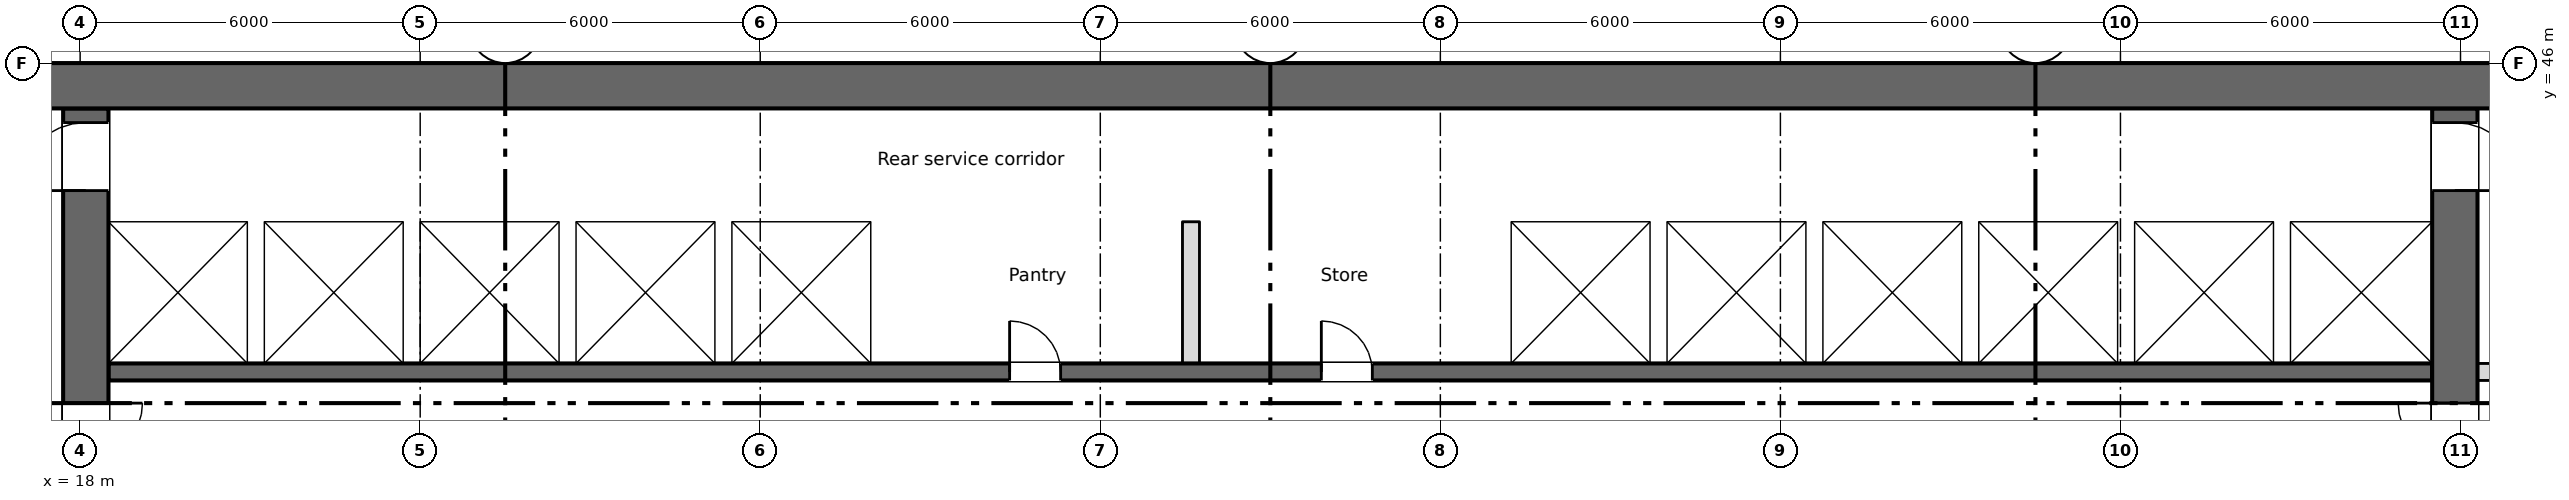
"""IFC4 building model, lengths in metres.
Left out: names, types, materials, properties, quantities, classifications, styles, units other than length and angle.
Written with IfcOpenShell. Run it as: python <this file> out.ifc"""

import sys

from ifc_helpers import new_model, si_unit, direction, frame, frame_2d, origin, place, context, subcontext, project, spatial, rectangle, extrude, element, fill, save


model = new_model("IFC4")
c1 = context("Model", 3, precision=1e-05, world=origin(), true_north=direction((0.0, 1.0)))
c2 = subcontext(c1, "Body", "Model", "MODEL_VIEW")
j1 = project(units=[si_unit("LENGTHUNIT", "METRE"), si_unit("PLANEANGLEUNIT", "RADIAN")], contexts=[c1])
p1 = place(None, origin())
s1 = spatial("IfcSite", under=j1, at=p1, CompositionType="ELEMENT")
p2 = place(p1, origin())
s2 = spatial("IfcBuilding", under=s1, at=p2, CompositionType="ELEMENT")
p3 = place(p2, frame((0.0, 0.0, 155.0)))
s3 = spatial("IfcBuildingStorey", under=s2, at=p3, CompositionType="ELEMENT", Elevation=155.0)
p4 = place(p3, frame((5.55, 45.6, 0.0), z_axis=(0.0, 0.0, 1.0), x_axis=(1.0, 0.0, 0.0)))
e1 = element("IfcWall", 1, at=p4, inside=s3, PredefinedType="SHEAR", context=c2, shape_type="SweptSolid", body=[
    extrude(rectangle(XDim=60.9, YDim=0.8, at=frame_2d((30.45, 0.0))), origin(), (0.0, 0.0, 1.0), 3.15),
])
p5 = place(p4, frame((1.2, 0.0, 0.6)))
e2 = element("IfcOpeningElement", 2, at=p5, cuts=e1, PredefinedType="OPENING", context=c2, shape_type="SweptSolid", body=[
    extrude(rectangle(XDim=0.6, YDim=2.4, at=frame_2d((0.3, 1.2))), frame((0.0, 0.41, 0.0), z_axis=(0.0, -1.0, 0.0), x_axis=(1.0, 0.0, 0.0)), (0.0, 0.0, 1.0), 0.82),
])
p6 = place(p4, frame((7.2, 0.0, 0.6)))
e3 = element("IfcOpeningElement", 3, at=p6, cuts=e1, PredefinedType="OPENING", context=c2, shape_type="SweptSolid", body=[
    extrude(rectangle(XDim=0.6, YDim=2.4, at=frame_2d((0.3, 1.2))), frame((0.0, 0.41, 0.0), z_axis=(0.0, -1.0, 0.0), x_axis=(1.0, 0.0, 0.0)), (0.0, 0.0, 1.0), 0.82),
])
p7 = place(p3, frame((18.1, 28.4, 0.0), z_axis=(0.0, 0.0, 1.0), x_axis=(0.0, 1.0, 0.0)))
e4 = element("IfcWall", 4, at=p7, inside=s3, PredefinedType="SHEAR", context=c2, shape_type="SweptSolid", body=[
    extrude(rectangle(XDim=16.8, YDim=0.8, at=frame_2d((8.4, 0.0))), origin(), (0.0, 0.0, 1.0), 3.15),
])
p8 = place(p7, frame((9.6, 0.0, 0.0)))
e5 = element("IfcOpeningElement", 5, at=p8, cuts=e4, PredefinedType="OPENING", context=c2, shape_type="SweptSolid", body=[
    extrude(rectangle(XDim=2.0, YDim=2.1, at=frame_2d((1.0, 1.05))), frame((0.0, 0.41, 0.0), z_axis=(0.0, -1.0, 0.0), x_axis=(1.0, 0.0, 0.0)), (0.0, 0.0, 1.0), 0.82),
])
p9 = place(p7, frame((15.35, 0.0, 0.0)))
e6 = element("IfcOpeningElement", 6, at=p9, cuts=e4, PredefinedType="OPENING", context=c2, shape_type="SweptSolid", body=[
    extrude(rectangle(XDim=1.2, YDim=2.1, at=frame_2d((0.6, 1.05))), frame((0.0, 0.41, 0.0), z_axis=(0.0, -1.0, 0.0), x_axis=(1.0, 0.0, 0.0)), (0.0, 0.0, 1.0), 0.82),
])
p10 = place(p3, frame((59.9, 28.4, 0.0), z_axis=(0.0, 0.0, 1.0), x_axis=(0.0, 1.0, 0.0)))
e7 = element("IfcWall", 7, at=p10, inside=s3, PredefinedType="SHEAR", context=c2, shape_type="SweptSolid", body=[
    extrude(rectangle(XDim=16.8, YDim=0.8, at=frame_2d((8.4, 0.0))), origin(), (0.0, 0.0, 1.0), 3.15),
])
p11 = place(p10, frame((9.6, 0.0, 0.0)))
e8 = element("IfcOpeningElement", 8, at=p11, cuts=e7, PredefinedType="OPENING", context=c2, shape_type="SweptSolid", body=[
    extrude(rectangle(XDim=2.0, YDim=2.1, at=frame_2d((1.0, 1.05))), frame((0.0, 0.41, 0.0), z_axis=(0.0, -1.0, 0.0), x_axis=(1.0, 0.0, 0.0)), (0.0, 0.0, 1.0), 0.82),
])
p12 = place(p10, frame((15.35, 0.0, 0.0)))
e9 = element("IfcOpeningElement", 9, at=p12, cuts=e7, PredefinedType="OPENING", context=c2, shape_type="SweptSolid", body=[
    extrude(rectangle(XDim=1.2, YDim=2.1, at=frame_2d((0.6, 1.05))), frame((0.0, 0.41, 0.0), z_axis=(0.0, -1.0, 0.0), x_axis=(1.0, 0.0, 0.0)), (0.0, 0.0, 1.0), 0.82),
])
p13 = place(p3, frame((18.5, 40.55, 0.0), z_axis=(0.0, 0.0, 1.0), x_axis=(1.0, 0.0, 0.0)))
e10 = element("IfcWall", 10, at=p13, inside=s3, PredefinedType="SHEAR", context=c2, shape_type="SweptSolid", body=[
    extrude(rectangle(XDim=41.0, YDim=0.3, at=frame_2d((20.5, 0.0))), origin(), (0.0, 0.0, 1.0), 3.15),
])
p14 = place(p13, frame((15.9, 0.0, 0.0)))
e11 = element("IfcOpeningElement", 11, at=p14, cuts=e10, PredefinedType="OPENING", context=c2, shape_type="SweptSolid", body=[
    extrude(rectangle(XDim=0.9, YDim=2.1, at=frame_2d((0.45, 1.05))), frame((0.0, 0.16, 0.0), z_axis=(0.0, -1.0, 0.0), x_axis=(1.0, 0.0, 0.0)), (0.0, 0.0, 1.0), 0.32),
])
p15 = place(p13, frame((21.4, 0.0, 0.0)))
e12 = element("IfcOpeningElement", 12, at=p15, cuts=e10, PredefinedType="OPENING", context=c2, shape_type="SweptSolid", body=[
    extrude(rectangle(XDim=0.9, YDim=2.1, at=frame_2d((0.45, 1.05))), frame((0.0, 0.16, 0.0), z_axis=(0.0, -1.0, 0.0), x_axis=(1.0, 0.0, 0.0)), (0.0, 0.0, 1.0), 0.32),
])
p16 = place(p13, frame((6.175, 0.0, 0.0)))
e13 = element("IfcOpeningElement", 13, at=p16, cuts=e10, PredefinedType="OPENING", context=c2, shape_type="SweptSolid", body=[
    extrude(rectangle(XDim=1.1, YDim=2.1, at=frame_2d((0.55, 1.05))), frame((0.0, 0.16, 0.0), z_axis=(0.0, -1.0, 0.0), x_axis=(1.0, 0.0, 0.0)), (0.0, 0.0, 1.0), 0.32),
])
p17 = place(p13, frame((8.925, 0.0, 0.0)))
e14 = element("IfcOpeningElement", 14, at=p17, cuts=e10, PredefinedType="OPENING", context=c2, shape_type="SweptSolid", body=[
    extrude(rectangle(XDim=1.1, YDim=2.1, at=frame_2d((0.55, 1.05))), frame((0.0, 0.16, 0.0), z_axis=(0.0, -1.0, 0.0), x_axis=(1.0, 0.0, 0.0)), (0.0, 0.0, 1.0), 0.32),
])
p18 = place(p13, frame((11.675, 0.0, 0.0)))
e15 = element("IfcOpeningElement", 15, at=p18, cuts=e10, PredefinedType="OPENING", context=c2, shape_type="SweptSolid", body=[
    extrude(rectangle(XDim=1.1, YDim=2.1, at=frame_2d((0.55, 1.05))), frame((0.0, 0.16, 0.0), z_axis=(0.0, -1.0, 0.0), x_axis=(1.0, 0.0, 0.0)), (0.0, 0.0, 1.0), 0.32),
])
p19 = place(p13, frame((30.925, 0.0, 0.0)))
e16 = element("IfcOpeningElement", 16, at=p19, cuts=e10, PredefinedType="OPENING", context=c2, shape_type="SweptSolid", body=[
    extrude(rectangle(XDim=1.1, YDim=2.1, at=frame_2d((0.55, 1.05))), frame((0.0, 0.16, 0.0), z_axis=(0.0, -1.0, 0.0), x_axis=(1.0, 0.0, 0.0)), (0.0, 0.0, 1.0), 0.32),
])
p20 = place(p13, frame((33.675, 0.0, 0.0)))
e17 = element("IfcOpeningElement", 17, at=p20, cuts=e10, PredefinedType="OPENING", context=c2, shape_type="SweptSolid", body=[
    extrude(rectangle(XDim=1.1, YDim=2.1, at=frame_2d((0.55, 1.05))), frame((0.0, 0.16, 0.0), z_axis=(0.0, -1.0, 0.0), x_axis=(1.0, 0.0, 0.0)), (0.0, 0.0, 1.0), 0.32),
])
p21 = place(p13, frame((36.375, 0.0, 0.0)))
e18 = element("IfcOpeningElement", 18, at=p21, cuts=e10, PredefinedType="OPENING", context=c2, shape_type="SweptSolid", body=[
    extrude(rectangle(XDim=1.2, YDim=2.1, at=frame_2d((0.6, 1.05))), frame((0.0, 0.16, 0.0), z_axis=(0.0, -1.0, 0.0), x_axis=(1.0, 0.0, 0.0)), (0.0, 0.0, 1.0), 0.32),
])
p22 = place(p13, frame((39.15, 0.0, 0.0)))
e19 = element("IfcOpeningElement", 19, at=p22, cuts=e10, PredefinedType="OPENING", context=c2, shape_type="SweptSolid", body=[
    extrude(rectangle(XDim=1.2, YDim=2.1, at=frame_2d((0.6, 1.05))), frame((0.0, 0.16, 0.0), z_axis=(0.0, -1.0, 0.0), x_axis=(1.0, 0.0, 0.0)), (0.0, 0.0, 1.0), 0.32),
])
p23 = place(p3, frame((18.5, 43.35, 0.0), z_axis=(0.0, 0.0, 1.0), x_axis=(1.0, 0.0, 0.0)))
e20 = element("IfcWall", 20, at=p23, inside=s3, PredefinedType="SHEAR", context=c2, shape_type="SweptSolid", body=[
    extrude(rectangle(XDim=41.0, YDim=0.3, at=frame_2d((20.5, 0.0))), origin(), (0.0, 0.0, 1.0), 3.15),
])
p24 = place(p3, frame((60.3, 40.55, 0.0), z_axis=(0.0, 0.0, 1.0), x_axis=(1.0, 0.0, 0.0)))
e21 = element("IfcWall", 21, at=p24, inside=s3, PredefinedType="PARTITIONING", context=c2, shape_type="SweptSolid", body=[
    extrude(rectangle(XDim=2.4, YDim=0.3, at=frame_2d((1.2, 0.0))), origin(), (0.0, 0.0, 1.0), 3.15),
])
p25 = place(p24, frame((0.675, 0.0, 0.0)))
e22 = element("IfcOpeningElement", 22, at=p25, cuts=e21, PredefinedType="OPENING", context=c2, shape_type="SweptSolid", body=[
    extrude(rectangle(XDim=0.9, YDim=2.1, at=frame_2d((0.45, 1.05))), frame((0.0, 0.16, 0.0), z_axis=(0.0, -1.0, 0.0), x_axis=(1.0, 0.0, 0.0)), (0.0, 0.0, 1.0), 0.32),
])
for number, where, z_axis, x_axis in (
    (23, (21.1, 40.7, 0.0), (0.0, 0.0, 1.0), (0.0, 1.0, 0.0)),
    (24, (23.85, 40.7, 0.0), (0.0, 0.0, 1.0), (0.0, 1.0, 0.0)),
    (25, (26.6, 40.7, 0.0), (0.0, 0.0, 1.0), (0.0, 1.0, 0.0)),
    (26, (29.35, 40.7, 0.0), (0.0, 0.0, 1.0), (0.0, 1.0, 0.0)),
    (27, (32.1, 40.7, 0.0), (0.0, 0.0, 1.0), (0.0, 1.0, 0.0)),
    (28, (43.1, 40.7, 0.0), (0.0, 0.0, 1.0), (0.0, 1.0, 0.0)),
    (29, (45.85, 40.7, 0.0), (0.0, 0.0, 1.0), (0.0, 1.0, 0.0)),
    (30, (48.6, 40.7, 0.0), (0.0, 0.0, 1.0), (0.0, 1.0, 0.0)),
    (31, (51.35, 40.7, 0.0), (0.0, 0.0, 1.0), (0.0, 1.0, 0.0)),
    (32, (54.1, 40.7, 0.0), (0.0, 0.0, 1.0), (0.0, 1.0, 0.0)),
    (33, (56.85, 40.7, 0.0), (0.0, 0.0, 1.0), (0.0, 1.0, 0.0)),
):
    element("IfcWall", number, at=place(p3, frame(where, z_axis=z_axis, x_axis=x_axis)), inside=s3, PredefinedType="SHEAR", context=c2, shape_type="SweptSolid", body=[
        extrude(rectangle(XDim=2.5, YDim=0.3, at=frame_2d((1.25, 0.0))), origin(), (0.0, 0.0, 1.0), 3.15),
    ])
p26 = place(p3, frame((37.6, 40.7, 0.0), z_axis=(0.0, 0.0, 1.0), x_axis=(0.0, 1.0, 0.0)))
e34 = element("IfcWall", 34, at=p26, inside=s3, PredefinedType="PARTITIONING", context=c2, shape_type="SweptSolid", body=[
    extrude(rectangle(XDim=2.5, YDim=0.3, at=frame_2d((1.25, 0.0))), origin(), (0.0, 0.0, 1.0), 3.15),
])
p27 = place(p14, origin())
e35 = element("IfcDoor", 35, at=p27, inside=s3, OperationType="SINGLE_SWING_LEFT", PredefinedType="DOOR", context=c2, shape_type="SweptSolid", body=[
    extrude(rectangle(XDim=0.9, YDim=2.1, at=frame_2d((0.45, 1.05))), frame((0.0, 0.025, 0.0), z_axis=(0.0, -1.0, 0.0), x_axis=(1.0, 0.0, 0.0)), (0.0, 0.0, 1.0), 0.05),
])
fill(e11, e35)
p28 = place(p15, origin())
e36 = element("IfcDoor", 36, at=p28, inside=s3, OperationType="SINGLE_SWING_LEFT", PredefinedType="DOOR", context=c2, shape_type="SweptSolid", body=[
    extrude(rectangle(XDim=0.9, YDim=2.1, at=frame_2d((0.45, 1.05))), frame((0.0, 0.025, 0.0), z_axis=(0.0, -1.0, 0.0), x_axis=(1.0, 0.0, 0.0)), (0.0, 0.0, 1.0), 0.05),
])
fill(e12, e36)
p29 = place(p16, origin())
e37 = element("IfcDoor", 37, at=p29, inside=s3, OperationType="SLIDING_TO_LEFT", PredefinedType="DOOR", context=c2, shape_type="SweptSolid", body=[
    extrude(rectangle(XDim=1.1, YDim=2.1, at=frame_2d((0.55, 1.05))), frame((0.0, 0.025, 0.0), z_axis=(0.0, -1.0, 0.0), x_axis=(1.0, 0.0, 0.0)), (0.0, 0.0, 1.0), 0.05),
])
fill(e13, e37)
p30 = place(p17, origin())
e38 = element("IfcDoor", 38, at=p30, inside=s3, OperationType="SLIDING_TO_LEFT", PredefinedType="DOOR", context=c2, shape_type="SweptSolid", body=[
    extrude(rectangle(XDim=1.1, YDim=2.1, at=frame_2d((0.55, 1.05))), frame((0.0, 0.025, 0.0), z_axis=(0.0, -1.0, 0.0), x_axis=(1.0, 0.0, 0.0)), (0.0, 0.0, 1.0), 0.05),
])
fill(e14, e38)
p31 = place(p18, origin())
e39 = element("IfcDoor", 39, at=p31, inside=s3, OperationType="SLIDING_TO_LEFT", PredefinedType="DOOR", context=c2, shape_type="SweptSolid", body=[
    extrude(rectangle(XDim=1.1, YDim=2.1, at=frame_2d((0.55, 1.05))), frame((0.0, 0.025, 0.0), z_axis=(0.0, -1.0, 0.0), x_axis=(1.0, 0.0, 0.0)), (0.0, 0.0, 1.0), 0.05),
])
fill(e15, e39)
p32 = place(p19, origin())
e40 = element("IfcDoor", 40, at=p32, inside=s3, OperationType="SLIDING_TO_LEFT", PredefinedType="DOOR", context=c2, shape_type="SweptSolid", body=[
    extrude(rectangle(XDim=1.1, YDim=2.1, at=frame_2d((0.55, 1.05))), frame((0.0, 0.025, 0.0), z_axis=(0.0, -1.0, 0.0), x_axis=(1.0, 0.0, 0.0)), (0.0, 0.0, 1.0), 0.05),
])
fill(e16, e40)
p33 = place(p20, origin())
e41 = element("IfcDoor", 41, at=p33, inside=s3, OperationType="SLIDING_TO_LEFT", PredefinedType="DOOR", context=c2, shape_type="SweptSolid", body=[
    extrude(rectangle(XDim=1.1, YDim=2.1, at=frame_2d((0.55, 1.05))), frame((0.0, 0.025, 0.0), z_axis=(0.0, -1.0, 0.0), x_axis=(1.0, 0.0, 0.0)), (0.0, 0.0, 1.0), 0.05),
])
fill(e17, e41)
p34 = place(p21, origin())
e42 = element("IfcDoor", 42, at=p34, inside=s3, OperationType="SLIDING_TO_LEFT", PredefinedType="DOOR", context=c2, shape_type="SweptSolid", body=[
    extrude(rectangle(XDim=1.2, YDim=2.1, at=frame_2d((0.6, 1.05))), frame((0.0, 0.025, 0.0), z_axis=(0.0, -1.0, 0.0), x_axis=(1.0, 0.0, 0.0)), (0.0, 0.0, 1.0), 0.05),
])
fill(e18, e42)
p35 = place(p22, origin())
e43 = element("IfcDoor", 43, at=p35, inside=s3, OperationType="SLIDING_TO_LEFT", PredefinedType="DOOR", context=c2, shape_type="SweptSolid", body=[
    extrude(rectangle(XDim=1.2, YDim=2.1, at=frame_2d((0.6, 1.05))), frame((0.0, 0.025, 0.0), z_axis=(0.0, -1.0, 0.0), x_axis=(1.0, 0.0, 0.0)), (0.0, 0.0, 1.0), 0.05),
])
fill(e19, e43)
p36 = place(p8, origin())
e44 = element("IfcDoor", 44, at=p36, inside=s3, OperationType="DOUBLE_DOOR_SINGLE_SWING", PredefinedType="DOOR", context=c2, shape_type="SweptSolid", body=[
    extrude(rectangle(XDim=2.0, YDim=2.1, at=frame_2d((1.0, 1.05))), frame((0.0, 0.025, 0.0), z_axis=(0.0, -1.0, 0.0), x_axis=(1.0, 0.0, 0.0)), (0.0, 0.0, 1.0), 0.05),
])
fill(e5, e44)
p37 = place(p11, origin())
e45 = element("IfcDoor", 45, at=p37, inside=s3, OperationType="DOUBLE_DOOR_SINGLE_SWING", PredefinedType="DOOR", context=c2, shape_type="SweptSolid", body=[
    extrude(rectangle(XDim=2.0, YDim=2.1, at=frame_2d((1.0, 1.05))), frame((0.0, 0.025, 0.0), z_axis=(0.0, -1.0, 0.0), x_axis=(1.0, 0.0, 0.0)), (0.0, 0.0, 1.0), 0.05),
])
fill(e8, e45)
p38 = place(p9, origin())
e46 = element("IfcDoor", 46, at=p38, inside=s3, OperationType="SINGLE_SWING_LEFT", PredefinedType="DOOR", context=c2, shape_type="SweptSolid", body=[
    extrude(rectangle(XDim=1.2, YDim=2.1, at=frame_2d((0.6, 1.05))), frame((0.0, 0.025, 0.0), z_axis=(0.0, -1.0, 0.0), x_axis=(1.0, 0.0, 0.0)), (0.0, 0.0, 1.0), 0.05),
])
fill(e6, e46)
p39 = place(p12, origin())
e47 = element("IfcDoor", 47, at=p39, inside=s3, OperationType="SINGLE_SWING_LEFT", PredefinedType="DOOR", context=c2, shape_type="SweptSolid", body=[
    extrude(rectangle(XDim=1.2, YDim=2.1, at=frame_2d((0.6, 1.05))), frame((0.0, 0.025, 0.0), z_axis=(0.0, -1.0, 0.0), x_axis=(1.0, 0.0, 0.0)), (0.0, 0.0, 1.0), 0.05),
])
fill(e9, e47)
save(model, sys.argv[1])
